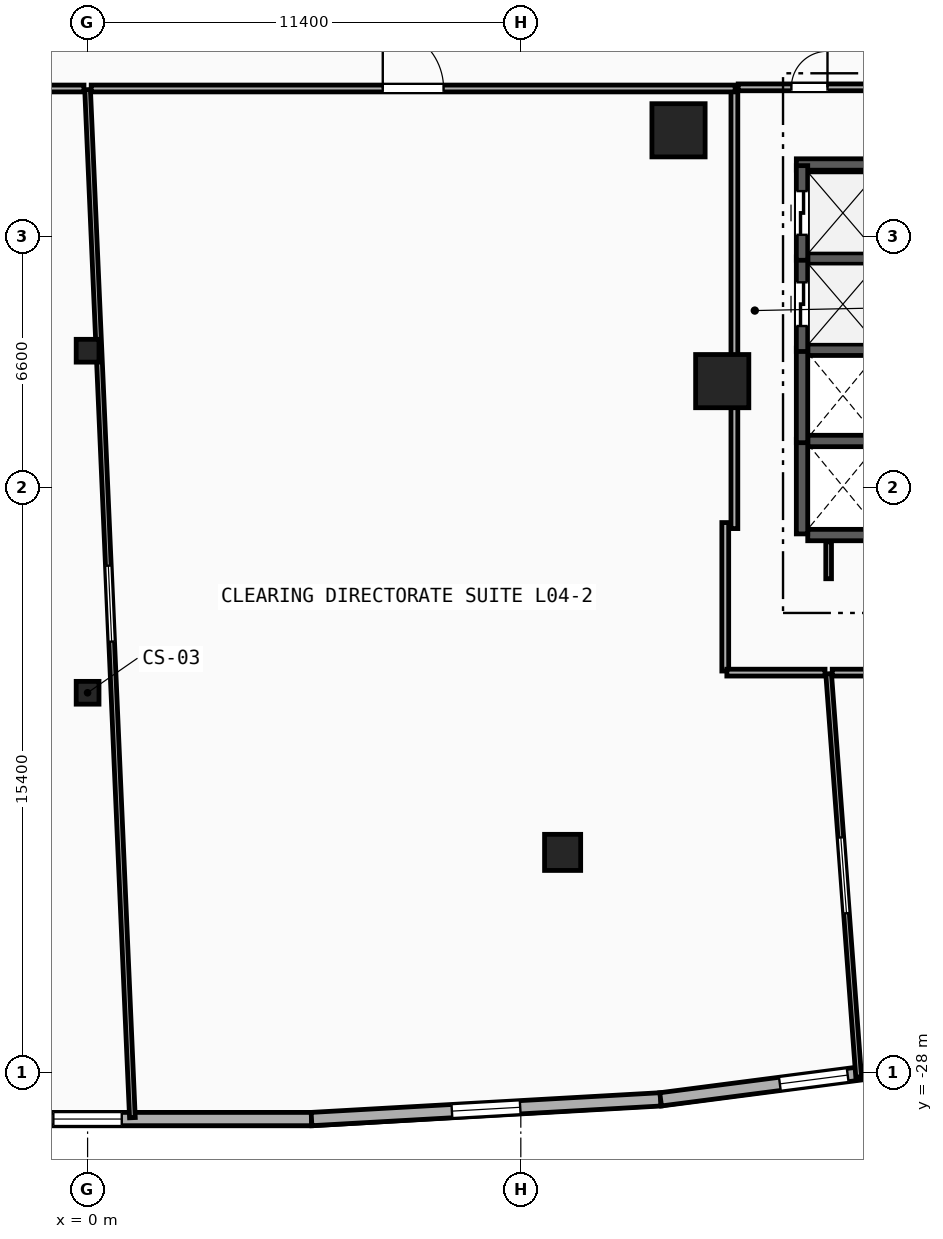
"""IFC4 building model, lengths in metres.
Left out: names, types, materials, properties, quantities, classifications, styles, units other than length and angle.
Written with IfcOpenShell. Run it as: python <this file> out.ifc"""

import sys

from ifc_helpers import new_model, si_unit, direction, frame, frame_2d, origin, origin_2d, place, context, subcontext, project, spatial, rectangle, hollow_rectangle, circle, extrude, element, fill, save


model = new_model("IFC4")
c1 = context("Model", 3, precision=1e-05, world=origin(), true_north=direction((0.0, 1.0)))
c2 = subcontext(c1, "Body", "Model", "MODEL_VIEW")
j1 = project(units=[si_unit("LENGTHUNIT", "METRE"), si_unit("PLANEANGLEUNIT", "RADIAN")], contexts=[c1])
p1 = place(None, origin())
s1 = spatial("IfcSite", under=j1, at=p1, CompositionType="ELEMENT")
p2 = place(p1, origin())
s2 = spatial("IfcBuilding", under=s1, at=p2, CompositionType="ELEMENT")
p3 = place(p2, frame((0.0, 0.0, 20.0)))
s3 = spatial("IfcBuildingStorey", under=s2, at=p3, CompositionType="ELEMENT", Elevation=20.0)
for number, where, z_axis, x_axis in (
    (1, (15.55, -3.2, 0.0), (0.0, 0.0, 1.0), (1.0, 0.0, 0.0)),
    (2, (16.7, -9.8, 0.0), (0.0, 0.0, 1.0), (1.0, 0.0, 0.0)),
):
    element("IfcColumn", number, at=place(p3, frame(where, z_axis=z_axis, x_axis=x_axis)), inside=s3, PredefinedType="COLUMN", context=c2, shape_type="SweptSolid", body=[
        extrude(rectangle(XDim=1.4, YDim=1.4, at=origin_2d()), origin(), (0.0, 0.0, 1.0), 4.0),
    ])
for number, where, z_axis, x_axis in (
    (3, (0.0, -18.0, 0.0), (0.0, 0.0, 1.0), (1.0, 0.0, 0.0)),
    (4, (0.0, -9.0, 0.0), (0.0, 0.0, 1.0), (1.0, 0.0, 0.0)),
):
    element("IfcColumn", number, at=place(p3, frame(where, z_axis=z_axis, x_axis=x_axis)), inside=s3, PredefinedType="COLUMN", context=c2, shape_type="SweptSolid", body=[
        extrude(hollow_rectangle(XDim=0.6, YDim=0.6, WallThickness=0.032, at=origin_2d()), origin(), (0.0, 0.0, 1.0), 3.695),
    ])
p4 = place(p3, frame((12.5, -22.2, 0.0), z_axis=(0.0, 0.0, 1.0), x_axis=(1.0, 0.0, 0.0)))
e5 = element("IfcColumn", 5, at=p4, inside=s3, PredefinedType="PILASTER", context=c2, shape_type="SweptSolid", body=[
    extrude(circle(Radius=0.475, at=origin_2d()), origin(), (0.0, 0.0, 1.0), 3.695),
])
p5 = place(p3, frame((-5.893, -29.216, 0.0), z_axis=(0.0, 0.0, 1.0), x_axis=(1.0, 0.0, 0.0)))
e6 = element("IfcWall", 6, at=p5, inside=s3, PredefinedType="SOLIDWALL", context=c2, shape_type="SweptSolid", body=[
    extrude(rectangle(XDim=11.785, YDim=0.35, at=frame_2d((5.893, 0.0))), origin(), (0.0, 0.0, 1.0), 3.7),
])
p6 = place(p5, frame((4.992, 0.0, 0.45)))
e7 = element("IfcOpeningElement", 7, at=p6, cuts=e6, PredefinedType="OPENING", context=c2, shape_type="SweptSolid", body=[
    extrude(rectangle(XDim=1.8, YDim=2.4, at=frame_2d((0.9, 1.2))), frame((0.0, 0.185, 0.0), z_axis=(0.0, -1.0, 0.0), x_axis=(1.0, 0.0, 0.0)), (0.0, 0.0, 1.0), 0.37),
])
p7 = place(p3, frame((5.893, -29.216, 0.0), z_axis=(0.0, 0.0, 1.0), x_axis=(0.998413463137, 0.056307695976, 0.0)))
e8 = element("IfcWall", 8, at=p7, inside=s3, PredefinedType="SOLIDWALL", context=c2, shape_type="SweptSolid", body=[
    extrude(rectangle(XDim=9.201, YDim=0.35, at=frame_2d((4.6, 0.0))), origin(), (0.0, 0.0, 1.0), 3.7),
])
p8 = place(p7, frame((3.7, 0.0, 0.45)))
e9 = element("IfcOpeningElement", 9, at=p8, cuts=e8, PredefinedType="OPENING", context=c2, shape_type="SweptSolid", body=[
    extrude(rectangle(XDim=1.8, YDim=2.4, at=frame_2d((0.9, 1.2))), frame((0.0, 0.185, 0.0), z_axis=(0.0, -1.0, 0.0), x_axis=(1.0, 0.0, 0.0)), (0.0, 0.0, 1.0), 0.37),
])
p9 = place(p3, frame((15.079, -28.698, 0.0), z_axis=(0.0, 0.0, 1.0), x_axis=(0.991688106477, 0.128665067026, 0.0)))
e10 = element("IfcWall", 10, at=p9, inside=s3, PredefinedType="SOLIDWALL", context=c2, shape_type="SweptSolid", body=[
    extrude(rectangle(XDim=8.129, YDim=0.35, at=frame_2d((4.064, 0.0))), origin(), (0.0, 0.0, 1.0), 3.7),
])
p10 = place(p9, frame((3.164, 0.0, 0.45)))
e11 = element("IfcOpeningElement", 11, at=p10, cuts=e10, PredefinedType="OPENING", context=c2, shape_type="SweptSolid", body=[
    extrude(rectangle(XDim=1.8, YDim=2.4, at=frame_2d((0.9, 1.2))), frame((0.0, 0.185, 0.0), z_axis=(0.0, -1.0, 0.0), x_axis=(1.0, 0.0, 0.0)), (0.0, 0.0, 1.0), 0.37),
])
p11 = place(p3, frame((18.95, -13.85, 0.0), z_axis=(0.0, 0.0, 1.0), x_axis=(1.0, 0.0, 0.0)))
e12 = element("IfcWall", 12, at=p11, inside=s3, PredefinedType="SHEAR", context=c2, shape_type="SweptSolid", body=[
    extrude(rectangle(XDim=1.85, YDim=0.3, at=frame_2d((0.925, 0.0))), origin(), (0.0, 0.0, 1.0), 3.7),
])
p12 = place(p3, frame((18.65, -4.1, 0.0), z_axis=(0.0, 0.0, 1.0), x_axis=(1.0, 0.0, 0.0)))
e13 = element("IfcWall", 13, at=p12, inside=s3, PredefinedType="SHEAR", context=c2, shape_type="SweptSolid", body=[
    extrude(rectangle(XDim=2.15, YDim=0.3, at=frame_2d((1.075, 0.0))), origin(), (0.0, 0.0, 1.0), 3.7),
])
for number, where, z_axis, x_axis in (
    (14, (18.95, -11.375, 0.0), (0.0, 0.0, 1.0), (1.0, 0.0, 0.0)),
    (15, (18.95, -8.975, 0.0), (0.0, 0.0, 1.0), (1.0, 0.0, 0.0)),
    (16, (18.95, -6.575, 0.0), (0.0, 0.0, 1.0), (1.0, 0.0, 0.0)),
):
    element("IfcWall", number, at=place(p3, frame(where, z_axis=z_axis, x_axis=x_axis)), inside=s3, PredefinedType="SHEAR", context=c2, shape_type="SweptSolid", body=[
        extrude(rectangle(XDim=1.85, YDim=0.3, at=frame_2d((0.925, 0.0))), origin(), (0.0, 0.0, 1.0), 3.7),
    ])
for number, where, z_axis, x_axis in (
    (17, (18.8, -13.82, 0.0), (0.0, 0.0, 1.0), (0.0, 1.0, 0.0)),
    (18, (18.8, -11.42, 0.0), (0.0, 0.0, 1.0), (0.0, 1.0, 0.0)),
):
    element("IfcWall", number, at=place(p3, frame(where, z_axis=z_axis, x_axis=x_axis)), inside=s3, PredefinedType="SHEAR", context=c2, shape_type="SweptSolid", body=[
        extrude(rectangle(XDim=2.49, YDim=0.3, at=frame_2d((1.245, 0.0))), origin(), (0.0, 0.0, 1.0), 3.7),
    ])
p13 = place(p3, frame((18.8, -9.02, 0.0), z_axis=(0.0, 0.0, 1.0), x_axis=(0.0, 1.0, 0.0)))
e19 = element("IfcWall", 19, at=p13, inside=s3, PredefinedType="SHEAR", context=c2, shape_type="SweptSolid", body=[
    extrude(rectangle(XDim=2.49, YDim=0.3, at=frame_2d((1.245, 0.0))), origin(), (0.0, 0.0, 1.0), 3.7),
])
p14 = place(p13, frame((0.67, 0.0, 0.0)))
e20 = element("IfcOpeningElement", 20, at=p14, cuts=e19, PredefinedType="OPENING", context=c2, shape_type="SweptSolid", body=[
    extrude(rectangle(XDim=1.15, YDim=2.2, at=frame_2d((0.575, 1.1))), frame((0.0, 0.16, 0.0), z_axis=(0.0, -1.0, 0.0), x_axis=(1.0, 0.0, 0.0)), (0.0, 0.0, 1.0), 0.32),
])
p15 = place(p3, frame((18.8, -6.62, 0.0), z_axis=(0.0, 0.0, 1.0), x_axis=(0.0, 1.0, 0.0)))
e21 = element("IfcWall", 21, at=p15, inside=s3, PredefinedType="SHEAR", context=c2, shape_type="SweptSolid", body=[
    extrude(rectangle(XDim=2.49, YDim=0.3, at=frame_2d((1.245, 0.0))), origin(), (0.0, 0.0, 1.0), 3.7),
])
p16 = place(p15, frame((0.67, 0.0, 0.0)))
e22 = element("IfcOpeningElement", 22, at=p16, cuts=e21, PredefinedType="OPENING", context=c2, shape_type="SweptSolid", body=[
    extrude(rectangle(XDim=1.15, YDim=2.2, at=frame_2d((0.575, 1.1))), frame((0.0, 0.16, 0.0), z_axis=(0.0, -1.0, 0.0), x_axis=(1.0, 0.0, 0.0)), (0.0, 0.0, 1.0), 0.32),
])
p17 = place(p3, frame((17.02, -13.68, 0.0), z_axis=(0.0, 0.0, 1.0), x_axis=(0.0, 1.0, 0.0)))
e23 = element("IfcWall", 23, at=p17, inside=s3, PredefinedType="PARTITIONING", context=c2, shape_type="SweptSolid", body=[
    extrude(rectangle(XDim=11.51, YDim=0.18, at=frame_2d((5.755, 0.0))), origin(), (0.0, 0.0, 1.0), 1.9),
])
p18 = place(p3, frame((17.12, -2.07, 0.0), z_axis=(0.0, 0.0, 1.0), x_axis=(1.0, 0.0, 0.0)))
e24 = element("IfcWall", 24, at=p18, inside=s3, PredefinedType="PARTITIONING", context=c2, shape_type="SweptSolid", body=[
    extrude(rectangle(XDim=3.75, YDim=0.18, at=frame_2d((1.875, 0.0))), origin(), (0.0, 0.0, 1.0), 3.7),
])
p19 = place(p18, frame((1.4, 0.0, 0.0)))
e25 = element("IfcOpeningElement", 25, at=p19, cuts=e24, PredefinedType="OPENING", context=c2, shape_type="SweptSolid", body=[
    extrude(rectangle(XDim=0.95, YDim=2.1, at=frame_2d((0.475, 1.05))), frame((0.0, 0.1, 0.0), z_axis=(0.0, -1.0, 0.0), x_axis=(1.0, 0.0, 0.0)), (0.0, 0.0, 1.0), 0.2),
])
p20 = place(p3, frame((1.179, -29.18, 0.0), z_axis=(0.0, 0.0, 1.0), x_axis=(-0.043560875221, 0.999050774561, 0.0)))
e26 = element("IfcWall", 26, at=p20, inside=s3, PredefinedType="PARTITIONING", context=c2, shape_type="SweptSolid", body=[
    extrude(rectangle(XDim=27.076, YDim=0.15, at=frame_2d((13.538, 0.0))), origin(), (0.0, 0.0, 1.0), 2.922),
])
p21 = place(p20, frame((12.538, 0.0, 1.05)))
e27 = element("IfcOpeningElement", 27, at=p21, cuts=e26, PredefinedType="OPENING", context=c2, shape_type="SweptSolid", body=[
    extrude(rectangle(XDim=2.0, YDim=1.5, at=frame_2d((1.0, 0.75))), frame((0.0, 0.085, 0.0), z_axis=(0.0, -1.0, 0.0), x_axis=(1.0, 0.0, 0.0)), (0.0, 0.0, 1.0), 0.17),
])
p22 = place(p3, frame((20.29, -28.108, 0.0), z_axis=(0.0, 0.0, 1.0), x_axis=(-0.074269014628, 0.997238243082, 0.0)))
e28 = element("IfcWall", 28, at=p22, inside=s3, PredefinedType="PARTITIONING", context=c2, shape_type="SweptSolid", body=[
    extrude(rectangle(XDim=10.637, YDim=0.15, at=frame_2d((5.319, 0.0))), origin(), (0.0, 0.0, 1.0), 3.7),
])
p23 = place(p22, frame((4.319, 0.0, 1.05)))
e29 = element("IfcOpeningElement", 29, at=p23, cuts=e28, PredefinedType="OPENING", context=c2, shape_type="SweptSolid", body=[
    extrude(rectangle(XDim=2.0, YDim=1.5, at=frame_2d((1.0, 0.75))), frame((0.0, 0.085, 0.0), z_axis=(0.0, -1.0, 0.0), x_axis=(1.0, 0.0, 0.0)), (0.0, 0.0, 1.0), 0.17),
])
p24 = place(p3, frame((19.5, -15.0, 0.0), z_axis=(0.0, 0.0, 1.0), x_axis=(0.0, 1.0, 0.0)))
e30 = element("IfcWall", 30, at=p24, inside=s3, PredefinedType="PARTITIONING", context=c2, shape_type="SweptSolid", body=[
    extrude(rectangle(XDim=0.97, YDim=0.15, at=frame_2d((0.485, 0.0))), origin(), (0.0, 0.0, 1.0), 3.7),
])
p25 = place(p3, frame((-8.1, -2.1, 0.0), z_axis=(0.0, 0.0, 1.0), x_axis=(1.0, 0.0, 0.0)))
e31 = element("IfcWall", 31, at=p25, inside=s3, PredefinedType="PARTITIONING", context=c2, shape_type="SweptSolid", body=[
    extrude(rectangle(XDim=8.005, YDim=0.18, at=frame_2d((4.002, 0.0))), origin(), (0.0, 0.0, 1.0), 3.7),
])
p26 = place(p25, frame((3.002, 0.0, 1.05)))
e32 = element("IfcOpeningElement", 32, at=p26, cuts=e31, PredefinedType="OPENING", context=c2, shape_type="SweptSolid", body=[
    extrude(rectangle(XDim=2.0, YDim=1.5, at=frame_2d((1.0, 0.75))), frame((0.0, 0.1, 0.0), z_axis=(0.0, -1.0, 0.0), x_axis=(1.0, 0.0, 0.0)), (0.0, 0.0, 1.0), 0.2),
])
p27 = place(p3, frame((0.095, -2.1, 0.0), z_axis=(0.0, 0.0, 1.0), x_axis=(1.0, 0.0, 0.0)))
e33 = element("IfcWall", 33, at=p27, inside=s3, PredefinedType="PARTITIONING", context=c2, shape_type="SweptSolid", body=[
    extrude(rectangle(XDim=16.945, YDim=0.18, at=frame_2d((8.473, 0.0))), origin(), (0.0, 0.0, 1.0), 2.922),
])
p28 = place(p27, frame((7.673, 0.0, 0.0)))
e34 = element("IfcOpeningElement", 34, at=p28, cuts=e33, PredefinedType="OPENING", context=c2, shape_type="SweptSolid", body=[
    extrude(rectangle(XDim=1.6, YDim=2.2, at=frame_2d((0.8, 1.1))), frame((0.0, 0.1, 0.0), z_axis=(0.0, -1.0, 0.0), x_axis=(1.0, 0.0, 0.0)), (0.0, 0.0, 1.0), 0.2),
])
p29 = place(p3, frame((16.78, -13.521, 0.0), z_axis=(0.0, 0.0, 1.0), x_axis=(0.0, -1.0, 0.0)))
e35 = element("IfcWall", 35, at=p29, inside=s3, PredefinedType="PARTITIONING", context=c2, shape_type="SweptSolid", body=[
    extrude(rectangle(XDim=3.907, YDim=0.18, at=frame_2d((1.954, 0.0))), origin(), (0.0, 0.0, 1.0), 3.7),
])
p30 = place(p3, frame((16.822, -17.47, 0.0), z_axis=(0.0, 0.0, 1.0), x_axis=(1.0, 0.0, 0.0)))
e36 = element("IfcWall", 36, at=p30, inside=s3, PredefinedType="PARTITIONING", context=c2, shape_type="SweptSolid", body=[
    extrude(rectangle(XDim=2.583, YDim=0.18, at=frame_2d((1.292, 0.0))), origin(), (0.0, 0.0, 1.0), 3.7),
])
p31 = place(p3, frame((19.595, -17.47, 0.0), z_axis=(0.0, 0.0, 1.0), x_axis=(1.0, 0.0, 0.0)))
e37 = element("IfcWall", 37, at=p31, inside=s3, PredefinedType="PARTITIONING", context=c2, shape_type="SweptSolid", body=[
    extrude(rectangle(XDim=14.033, YDim=0.18, at=frame_2d((7.017, 0.0))), origin(), (0.0, 0.0, 1.0), 1.9),
])
p32 = place(p6, origin())
e38 = element("IfcWindow", 38, at=p32, inside=s3, PartitioningType="SINGLE_PANEL", PredefinedType="WINDOW", context=c2, shape_type="SweptSolid", body=[
    extrude(rectangle(XDim=1.8, YDim=2.4, at=frame_2d((0.9, 1.2))), frame((0.0, 0.03, 0.0), z_axis=(0.0, -1.0, 0.0), x_axis=(1.0, 0.0, 0.0)), (0.0, 0.0, 1.0), 0.06),
])
fill(e7, e38)
p33 = place(p8, origin())
e39 = element("IfcWindow", 39, at=p33, inside=s3, PartitioningType="SINGLE_PANEL", PredefinedType="WINDOW", context=c2, shape_type="SweptSolid", body=[
    extrude(rectangle(XDim=1.8, YDim=2.4, at=frame_2d((0.9, 1.2))), frame((0.0, 0.03, 0.0), z_axis=(0.0, -1.0, 0.0), x_axis=(1.0, 0.0, 0.0)), (0.0, 0.0, 1.0), 0.06),
])
fill(e9, e39)
p34 = place(p10, origin())
e40 = element("IfcWindow", 40, at=p34, inside=s3, PartitioningType="SINGLE_PANEL", PredefinedType="WINDOW", context=c2, shape_type="SweptSolid", body=[
    extrude(rectangle(XDim=1.8, YDim=2.4, at=frame_2d((0.9, 1.2))), frame((0.0, 0.03, 0.0), z_axis=(0.0, -1.0, 0.0), x_axis=(1.0, 0.0, 0.0)), (0.0, 0.0, 1.0), 0.06),
])
fill(e11, e40)
p35 = place(p14, origin())
e41 = element("IfcDoor", 41, at=p35, inside=s3, OperationType="SLIDING_TO_LEFT", PredefinedType="TRAPDOOR", context=c2, shape_type="SweptSolid", body=[
    extrude(rectangle(XDim=1.15, YDim=2.2, at=frame_2d((0.575, 1.1))), frame((0.0, 0.025, 0.0), z_axis=(0.0, -1.0, 0.0), x_axis=(1.0, 0.0, 0.0)), (0.0, 0.0, 1.0), 0.05),
])
fill(e20, e41)
p36 = place(p16, origin())
e42 = element("IfcDoor", 42, at=p36, inside=s3, OperationType="SLIDING_TO_LEFT", PredefinedType="TRAPDOOR", context=c2, shape_type="SweptSolid", body=[
    extrude(rectangle(XDim=1.15, YDim=2.2, at=frame_2d((0.575, 1.1))), frame((0.0, 0.025, 0.0), z_axis=(0.0, -1.0, 0.0), x_axis=(1.0, 0.0, 0.0)), (0.0, 0.0, 1.0), 0.05),
])
fill(e22, e42)
p37 = place(p28, origin())
e43 = element("IfcDoor", 43, at=p37, inside=s3, OperationType="SINGLE_SWING_LEFT", PredefinedType="DOOR", context=c2, shape_type="SweptSolid", body=[
    extrude(rectangle(XDim=1.6, YDim=2.2, at=frame_2d((0.8, 1.1))), frame((0.0, 0.025, 0.0), z_axis=(0.0, -1.0, 0.0), x_axis=(1.0, 0.0, 0.0)), (0.0, 0.0, 1.0), 0.05),
])
fill(e34, e43)
p38 = place(p19, origin())
e44 = element("IfcDoor", 44, at=p38, inside=s3, OperationType="SINGLE_SWING_RIGHT", PredefinedType="DOOR", context=c2, shape_type="SweptSolid", body=[
    extrude(rectangle(XDim=0.95, YDim=2.1, at=frame_2d((0.475, 1.05))), frame((0.0, 0.025, 0.0), z_axis=(0.0, -1.0, 0.0), x_axis=(1.0, 0.0, 0.0)), (0.0, 0.0, 1.0), 0.05),
])
fill(e25, e44)
p39 = place(p21, origin())
e45 = element("IfcWindow", 45, at=p39, inside=s3, PartitioningType="SINGLE_PANEL", PredefinedType="WINDOW", context=c2, shape_type="SweptSolid", body=[
    extrude(rectangle(XDim=2.0, YDim=1.5, at=frame_2d((1.0, 0.75))), frame((0.0, 0.03, 0.0), z_axis=(0.0, -1.0, 0.0), x_axis=(1.0, 0.0, 0.0)), (0.0, 0.0, 1.0), 0.06),
])
fill(e27, e45)
p40 = place(p23, origin())
e46 = element("IfcWindow", 46, at=p40, inside=s3, PartitioningType="SINGLE_PANEL", PredefinedType="WINDOW", context=c2, shape_type="SweptSolid", body=[
    extrude(rectangle(XDim=2.0, YDim=1.5, at=frame_2d((1.0, 0.75))), frame((0.0, 0.03, 0.0), z_axis=(0.0, -1.0, 0.0), x_axis=(1.0, 0.0, 0.0)), (0.0, 0.0, 1.0), 0.06),
])
fill(e29, e46)
save(model, sys.argv[1])
